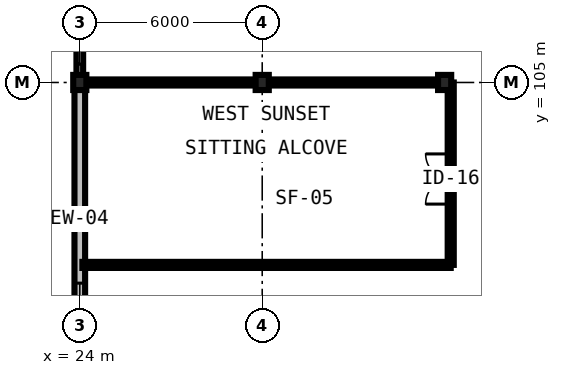
"""IFC4 building model, lengths in metres.
Left out: names, types, materials, properties, quantities, classifications, styles, units other than length and angle.
Written with IfcOpenShell. Run it as: python <this file> out.ifc"""

import sys

from ifc_helpers import new_model, si_unit, direction, frame, frame_2d, origin, origin_2d, place, context, subcontext, project, spatial, rectangle, i_section, extrude, element, fill, save


model = new_model("IFC4")
c1 = context("Model", 3, precision=1e-05, world=origin(), true_north=direction((0.0, 1.0)))
c2 = subcontext(c1, "Body", "Model", "MODEL_VIEW")
j1 = project(units=[si_unit("LENGTHUNIT", "METRE"), si_unit("PLANEANGLEUNIT", "RADIAN")], contexts=[c1])
p1 = place(None, origin())
s1 = spatial("IfcSite", under=j1, at=p1, CompositionType="ELEMENT")
p2 = place(p1, origin())
s2 = spatial("IfcBuilding", under=s1, at=p2, CompositionType="ELEMENT")
p3 = place(p2, frame((0.0, 0.0, 27.6)))
s3 = spatial("IfcBuildingStorey", under=s2, at=p3, CompositionType="ELEMENT", Elevation=27.6)
for number, where, z_axis, x_axis in (
    (1, (24.0, 105.0, 0.0), (0.0, 0.0, 1.0), (1.0, 0.0, 0.0)),
    (2, (30.0, 105.0, 0.0), (0.0, 0.0, 1.0), (1.0, 0.0, 0.0)),
    (3, (36.0, 105.0, 0.0), (0.0, 0.0, 1.0), (1.0, 0.0, 0.0)),
):
    element("IfcColumn", number, at=place(p3, frame(where, z_axis=z_axis, x_axis=x_axis)), inside=s3, PredefinedType="COLUMN", context=c2, shape_type="SweptSolid", body=[
        extrude(i_section(OverallWidth=0.432, OverallDepth=0.498, WebThickness=0.056, FlangeThickness=0.089, FilletRadius=0.031, at=origin_2d()), origin(), (0.0, 0.0, 1.0), 3.6),
    ])
p4 = place(p3, frame((24.0, 105.0, 0.0), z_axis=(0.0, 0.0, 1.0), x_axis=(0.0, -1.0, 0.0)))
e4 = element("IfcWall", 4, at=p4, inside=s3, PredefinedType="STANDARD", context=c2, shape_type="SweptSolid", body=[
    extrude(rectangle(XDim=9.0, YDim=0.35, at=frame_2d((4.5, 0.0))), origin(), (0.0, 0.0, 1.0), 2.981),
])
p5 = place(p4, frame((6.6, 0.0, 0.85)))
e5 = element("IfcOpeningElement", 5, at=p5, cuts=e4, PredefinedType="OPENING", context=c2, shape_type="SweptSolid", body=[
    extrude(rectangle(XDim=1.8, YDim=1.5, at=frame_2d((0.9, 0.75))), frame((0.0, 0.19, 0.0), z_axis=(0.0, -1.0, 0.0), x_axis=(1.0, 0.0, 0.0)), (0.0, 0.0, 1.0), 0.38),
])
p6 = place(p3, frame((24.0, 117.0, 0.0), z_axis=(0.0, 0.0, 1.0), x_axis=(0.0, -1.0, 0.0)))
e6 = element("IfcWall", 6, at=p6, inside=s3, PredefinedType="PARAPET", context=c2, shape_type="SweptSolid", body=[
    extrude(rectangle(XDim=12.0, YDim=0.22, at=frame_2d((6.0, 0.0))), origin(), (0.0, 0.0, 1.0), 0.2),
])
p7 = place(p3, frame((24.085, 99.0, 0.0), z_axis=(0.0, 0.0, 1.0), x_axis=(1.0, 0.0, 0.0)))
e7 = element("IfcWall", 7, at=p7, inside=s3, PredefinedType="PARTITIONING", context=c2, shape_type="SweptSolid", body=[
    extrude(rectangle(XDim=12.115, YDim=0.2, at=frame_2d((6.057, 0.0))), origin(), (0.0, 0.0, 1.0), 3.29),
])
p8 = place(p3, frame((36.2, 99.0, 0.0), z_axis=(0.0, 0.0, 1.0), x_axis=(0.0, 1.0, 0.0)))
e8 = element("IfcWall", 8, at=p8, inside=s3, PredefinedType="PARTITIONING", context=c2, shape_type="SweptSolid", body=[
    extrude(rectangle(XDim=6.0, YDim=0.2, at=frame_2d((3.0, 0.0))), origin(), (0.0, 0.0, 1.0), 3.29),
])
p9 = place(p8, frame((2.0, 0.0, 0.0)))
e9 = element("IfcOpeningElement", 9, at=p9, cuts=e8, PredefinedType="OPENING", context=c2, shape_type="SweptSolid", body=[
    extrude(rectangle(XDim=1.65, YDim=2.25, at=frame_2d((0.825, 1.125))), frame((0.0, 0.115, 0.0), z_axis=(0.0, -1.0, 0.0), x_axis=(1.0, 0.0, 0.0)), (0.0, 0.0, 1.0), 0.23),
])
p10 = place(p3, frame((36.2, 105.0, 0.0), z_axis=(0.0, 0.0, 1.0), x_axis=(-1.0, 0.0, 0.0)))
e10 = element("IfcWall", 10, at=p10, inside=s3, PredefinedType="PARTITIONING", context=c2, shape_type="SweptSolid", body=[
    extrude(rectangle(XDim=12.115, YDim=0.2, at=frame_2d((6.057, 0.0))), origin(), (0.0, 0.0, 1.0), 2.736),
])
p11 = place(p5, origin())
e11 = element("IfcWindow", 11, at=p11, inside=s3, PartitioningType="SINGLE_PANEL", PredefinedType="WINDOW", context=c2, shape_type="SweptSolid", body=[
    extrude(rectangle(XDim=1.8, YDim=1.5, at=frame_2d((0.9, 0.75))), frame((0.0, 0.03, 0.0), z_axis=(0.0, -1.0, 0.0), x_axis=(1.0, 0.0, 0.0)), (0.0, 0.0, 1.0), 0.06),
])
fill(e5, e11)
p12 = place(p9, origin())
e12 = element("IfcDoor", 12, at=p12, inside=s3, OperationType="DOUBLE_DOOR_SINGLE_SWING", PredefinedType="DOOR", context=c2, shape_type="SweptSolid", body=[
    extrude(rectangle(XDim=1.65, YDim=2.25, at=frame_2d((0.825, 1.125))), frame((0.0, 0.025, 0.0), z_axis=(0.0, -1.0, 0.0), x_axis=(1.0, 0.0, 0.0)), (0.0, 0.0, 1.0), 0.05),
])
fill(e9, e12)
save(model, sys.argv[1])
